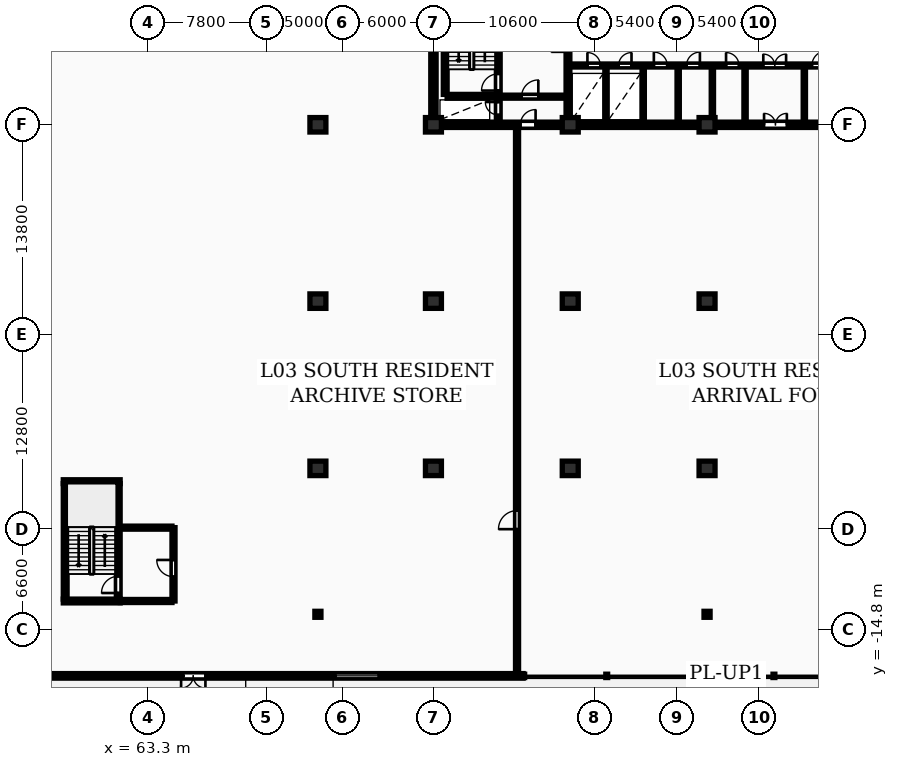
"""IFC4 building model, lengths in metres.
Left out: names, types, materials, properties, quantities, classifications, styles, units other than length and angle.
Written with IfcOpenShell. Run it as: python <this file> out.ifc"""

import sys

from ifc_helpers import new_model, si_unit, direction, frame, frame_2d, origin, origin_2d, place, context, subcontext, project, spatial, rectangle, i_section, extrude, element, fill, save


model = new_model("IFC4")
c1 = context("Model", 3, precision=1e-05, world=origin(), true_north=direction((0.0, 1.0)))
c2 = subcontext(c1, "Body", "Model", "MODEL_VIEW")
j1 = project(units=[si_unit("LENGTHUNIT", "METRE"), si_unit("PLANEANGLEUNIT", "RADIAN")], contexts=[c1])
p1 = place(None, origin())
s1 = spatial("IfcSite", under=j1, at=p1, CompositionType="ELEMENT")
p2 = place(p1, origin())
s2 = spatial("IfcBuilding", under=s1, at=p2, CompositionType="ELEMENT")
p3 = place(p2, frame((0.0, 0.0, 14.5)))
s3 = spatial("IfcBuildingStorey", under=s2, at=p3, CompositionType="ELEMENT", Elevation=14.5)
for number, where, z_axis, x_axis in (
    (1, (74.5, -4.2, 0.0), (0.0, 0.0, 1.0), (1.0, 0.0, 0.0)),
    (2, (74.5, 6.8, 0.0), (0.0, 0.0, 1.0), (1.0, 0.0, 0.0)),
    (3, (74.5, 18.4, 0.0), (0.0, 0.0, 1.0), (1.0, 0.0, 0.0)),
    (4, (82.1, -4.2, 0.0), (0.0, 0.0, 1.0), (1.0, 0.0, 0.0)),
    (5, (82.1, 6.8, 0.0), (0.0, 0.0, 1.0), (1.0, 0.0, 0.0)),
    (6, (82.1, 18.4, 0.0), (0.0, 0.0, 1.0), (1.0, 0.0, 0.0)),
    (7, (91.1, -4.2, 0.0), (0.0, 0.0, 1.0), (1.0, 0.0, 0.0)),
    (8, (91.1, 6.8, 0.0), (0.0, 0.0, 1.0), (1.0, 0.0, 0.0)),
    (9, (91.1, 18.4, 0.0), (0.0, 0.0, 1.0), (1.0, 0.0, 0.0)),
    (10, (100.1, -4.2, 0.0), (0.0, 0.0, 1.0), (1.0, 0.0, 0.0)),
    (11, (100.1, 6.8, 0.0), (0.0, 0.0, 1.0), (1.0, 0.0, 0.0)),
    (12, (100.1, 18.4, 0.0), (0.0, 0.0, 1.0), (1.0, 0.0, 0.0)),
):
    element("IfcColumn", number, at=place(p3, frame(where, z_axis=z_axis, x_axis=x_axis)), inside=s3, PredefinedType="COLUMN", context=c2, shape_type="SweptSolid", body=[
        extrude(rectangle(XDim=1.05, YDim=0.95, at=origin_2d()), origin(), (0.0, 0.0, 1.0), 4.5),
    ])
for number, where, z_axis, x_axis in (
    (13, (74.5, -13.8, 0.0), (0.0, 0.0, 1.0), (1.0, 0.0, 0.0)),
    (14, (100.1, -13.8, 0.0), (0.0, 0.0, 1.0), (1.0, 0.0, 0.0)),
):
    element("IfcColumn", number, at=place(p3, frame(where, z_axis=z_axis, x_axis=x_axis)), inside=s3, PredefinedType="COLUMN", context=c2, shape_type="SweptSolid", body=[
        extrude(i_section(OverallWidth=0.399, OverallDepth=0.394, WebThickness=0.023, FlangeThickness=0.037, FilletRadius=0.015, at=origin_2d()), origin(), (0.0, 0.0, 1.0), 4.5),
    ])
p4 = place(p3, frame((51.5, -17.85, 0.0), z_axis=(0.0, 0.0, 1.0), x_axis=(1.0, 0.0, 0.0)))
e15 = element("IfcWall", 15, at=p4, inside=s3, PredefinedType="STANDARD", context=c2, shape_type="SweptSolid", body=[
    extrude(rectangle(XDim=36.5, YDim=0.3, at=frame_2d((18.25, 0.0))), origin(), (0.0, 0.0, 1.0), 4.18),
])
p5 = place(p4, frame((14.0, 0.0, 0.0)))
e16 = element("IfcOpeningElement", 16, at=p5, cuts=e15, PredefinedType="OPENING", context=c2, shape_type="SweptSolid", body=[
    extrude(rectangle(XDim=1.6, YDim=2.2, at=frame_2d((0.8, 1.1))), frame((0.0, 0.16, 0.0), z_axis=(0.0, -1.0, 0.0), x_axis=(1.0, 0.0, 0.0)), (0.0, 0.0, 1.0), 0.32),
])
p6 = place(p4, frame((24.0, 0.0, 0.9)))
e17 = element("IfcOpeningElement", 17, at=p6, cuts=e15, PredefinedType="OPENING", context=c2, shape_type="SweptSolid", body=[
    extrude(rectangle(XDim=3.0, YDim=2.6, at=frame_2d((1.5, 1.3))), frame((0.0, 0.16, 0.0), z_axis=(0.0, -1.0, 0.0), x_axis=(1.0, 0.0, 0.0)), (0.0, 0.0, 1.0), 0.32),
])
p7 = place(p3, frame((82.1, 18.575, 0.0), z_axis=(0.0, 0.0, 1.0), x_axis=(0.0, 1.0, 0.0)))
e18 = element("IfcWall", 18, at=p7, inside=s3, PredefinedType="SHEAR", context=c2, shape_type="SweptSolid", body=[
    extrude(rectangle(XDim=11.65, YDim=0.35, at=frame_2d((5.825, 0.0))), origin(), (0.0, 0.0, 1.0), 4.5),
])
p8 = place(p3, frame((81.925, 18.4, 0.0), z_axis=(0.0, 0.0, 1.0), x_axis=(1.0, 0.0, 0.0)))
e19 = element("IfcWall", 19, at=p8, inside=s3, PredefinedType="SHEAR", context=c2, shape_type="SweptSolid", body=[
    extrude(rectangle(XDim=36.265, YDim=0.35, at=frame_2d((18.132, 0.0))), origin(), (0.0, 0.0, 1.0), 4.5),
])
p9 = place(p8, frame((5.895, 0.0, 0.0)))
e20 = element("IfcOpeningElement", 20, at=p9, cuts=e19, PredefinedType="OPENING", context=c2, shape_type="SweptSolid", body=[
    extrude(rectangle(XDim=1.0, YDim=2.15, at=frame_2d((0.5, 1.075))), frame((0.0, 0.185, 0.0), z_axis=(0.0, -1.0, 0.0), x_axis=(1.0, 0.0, 0.0)), (0.0, 0.0, 1.0), 0.37),
])
p10 = place(p8, frame((21.925, 0.0, 0.0)))
e21 = element("IfcOpeningElement", 21, at=p10, cuts=e19, PredefinedType="OPENING", context=c2, shape_type="SweptSolid", body=[
    extrude(rectangle(XDim=1.5, YDim=2.2, at=frame_2d((0.75, 1.1))), frame((0.0, 0.185, 0.0), z_axis=(0.0, -1.0, 0.0), x_axis=(1.0, 0.0, 0.0)), (0.0, 0.0, 1.0), 0.37),
])
p11 = place(p8, frame((29.875, 0.0, 0.0)))
e22 = element("IfcOpeningElement", 22, at=p11, cuts=e19, PredefinedType="OPENING", context=c2, shape_type="SweptSolid", body=[
    extrude(rectangle(XDim=1.0, YDim=2.15, at=frame_2d((0.5, 1.075))), frame((0.0, 0.185, 0.0), z_axis=(0.0, -1.0, 0.0), x_axis=(1.0, 0.0, 0.0)), (0.0, 0.0, 1.0), 0.37),
])
p12 = place(p3, frame((82.875, 20.4, 0.0), z_axis=(0.0, 0.0, 1.0), x_axis=(0.0, 1.0, 0.0)))
e23 = element("IfcWall", 23, at=p12, inside=s3, PredefinedType="SHEAR", context=c2, shape_type="SweptSolid", body=[
    extrude(rectangle(XDim=7.6, YDim=0.25, at=frame_2d((3.8, 0.0))), origin(), (0.0, 0.0, 1.0), 4.5),
])
p13 = place(p3, frame((86.365, 18.6, 0.0), z_axis=(0.0, 0.0, 1.0), x_axis=(0.0, 1.0, 0.0)))
e24 = element("IfcWall", 24, at=p13, inside=s3, PredefinedType="SHEAR", context=c2, shape_type="SweptSolid", body=[
    extrude(rectangle(XDim=11.6, YDim=0.25, at=frame_2d((5.8, 0.0))), origin(), (0.0, 0.0, 1.0), 4.5),
])
p14 = place(p13, frame((0.45, 0.0, 0.0)))
e25 = element("IfcOpeningElement", 25, at=p14, cuts=e24, PredefinedType="OPENING", context=c2, shape_type="SweptSolid", body=[
    extrude(rectangle(XDim=0.85, YDim=2.05, at=frame_2d((0.425, 1.025))), frame((0.0, 0.135, 0.0), z_axis=(0.0, -1.0, 0.0), x_axis=(1.0, 0.0, 0.0)), (0.0, 0.0, 1.0), 0.27),
])
p15 = place(p13, frame((2.05, 0.0, 0.0)))
e26 = element("IfcOpeningElement", 26, at=p15, cuts=e24, PredefinedType="OPENING", context=c2, shape_type="SweptSolid", body=[
    extrude(rectangle(XDim=1.1, YDim=2.1, at=frame_2d((0.55, 1.05))), frame((0.0, 0.135, 0.0), z_axis=(0.0, -1.0, 0.0), x_axis=(1.0, 0.0, 0.0)), (0.0, 0.0, 1.0), 0.27),
])
p16 = place(p13, frame((9.95, 0.0, 0.0)))
e27 = element("IfcOpeningElement", 27, at=p16, cuts=e24, PredefinedType="OPENING", context=c2, shape_type="SweptSolid", body=[
    extrude(rectangle(XDim=0.85, YDim=2.05, at=frame_2d((0.425, 1.025))), frame((0.0, 0.135, 0.0), z_axis=(0.0, -1.0, 0.0), x_axis=(1.0, 0.0, 0.0)), (0.0, 0.0, 1.0), 0.27),
])
p17 = place(p3, frame((83.0, 20.275, 0.0), z_axis=(0.0, 0.0, 1.0), x_axis=(1.0, 0.0, 0.0)))
e28 = element("IfcWall", 28, at=p17, inside=s3, PredefinedType="SHEAR", context=c2, shape_type="SweptSolid", body=[
    extrude(rectangle(XDim=3.24, YDim=0.25, at=frame_2d((1.62, 0.0))), origin(), (0.0, 0.0, 1.0), 4.5),
])
p18 = place(p3, frame((86.5, 20.25, 0.0), z_axis=(0.0, 0.0, 1.0), x_axis=(1.0, 0.0, 0.0)))
e29 = element("IfcWall", 29, at=p18, inside=s3, PredefinedType="PARTITIONING", context=c2, shape_type="SweptSolid", body=[
    extrude(rectangle(XDim=4.32, YDim=0.2, at=frame_2d((2.16, 0.0))), origin(), (0.0, 0.0, 1.0), 4.18),
])
p19 = place(p18, frame((1.4, 0.0, 0.0)))
e30 = element("IfcOpeningElement", 30, at=p19, cuts=e29, PredefinedType="OPENING", context=c2, shape_type="SweptSolid", body=[
    extrude(rectangle(XDim=1.1, YDim=2.1, at=frame_2d((0.55, 1.05))), frame((0.0, 0.11, 0.0), z_axis=(0.0, -1.0, 0.0), x_axis=(1.0, 0.0, 0.0)), (0.0, 0.0, 1.0), 0.22),
])
p20 = place(p3, frame((90.95, 18.6, 0.0), z_axis=(0.0, 0.0, 1.0), x_axis=(0.0, 1.0, 0.0)))
e31 = element("IfcWall", 31, at=p20, inside=s3, PredefinedType="SHEAR", context=c2, shape_type="SweptSolid", body=[
    extrude(rectangle(XDim=11.6, YDim=0.25, at=frame_2d((5.8, 0.0))), origin(), (0.0, 0.0, 1.0), 4.5),
])
p21 = place(p20, frame((4.6, 0.0, 0.0)))
e32 = element("IfcOpeningElement", 32, at=p21, cuts=e31, PredefinedType="OPENING", context=c2, shape_type="SweptSolid", body=[
    extrude(rectangle(XDim=1.1, YDim=2.1, at=frame_2d((0.55, 1.05))), frame((0.0, 0.135, 0.0), z_axis=(0.0, -1.0, 0.0), x_axis=(1.0, 0.0, 0.0)), (0.0, 0.0, 1.0), 0.27),
])
for number, where, z_axis, x_axis in (
    (33, (93.45, 18.6, 0.0), (0.0, 0.0, 1.0), (0.0, 1.0, 0.0)),
    (34, (95.9, 18.6, 0.0), (0.0, 0.0, 1.0), (0.0, 1.0, 0.0)),
    (35, (98.2, 18.6, 0.0), (0.0, 0.0, 1.0), (0.0, 1.0, 0.0)),
):
    element("IfcWall", number, at=place(p3, frame(where, z_axis=z_axis, x_axis=x_axis)), inside=s3, PredefinedType="PARTITIONING", context=c2, shape_type="SweptSolid", body=[
        extrude(rectangle(XDim=3.6, YDim=0.15, at=frame_2d((1.8, 0.0))), origin(), (0.0, 0.0, 1.0), 4.18),
    ])
p22 = place(p3, frame((100.45, 18.6, 0.0), z_axis=(0.0, 0.0, 1.0), x_axis=(0.0, 1.0, 0.0)))
e36 = element("IfcWall", 36, at=p22, inside=s3, PredefinedType="PARTITIONING", context=c2, shape_type="SweptSolid", body=[
    extrude(rectangle(XDim=3.6, YDim=0.15, at=frame_2d((1.8, 0.0))), origin(), (0.0, 0.0, 1.0), 3.43),
])
for number, where, z_axis, x_axis in (
    (37, (102.6, 18.6, 0.0), (0.0, 0.0, 1.0), (0.0, 1.0, 0.0)),
    (38, (106.5, 18.6, 0.0), (0.0, 0.0, 1.0), (0.0, 1.0, 0.0)),
):
    element("IfcWall", number, at=place(p3, frame(where, z_axis=z_axis, x_axis=x_axis)), inside=s3, PredefinedType="PARTITIONING", context=c2, shape_type="SweptSolid", body=[
        extrude(rectangle(XDim=3.6, YDim=0.15, at=frame_2d((1.8, 0.0))), origin(), (0.0, 0.0, 1.0), 4.18),
    ])
p23 = place(p3, frame((91.08, 22.3, 0.0), z_axis=(0.0, 0.0, 1.0), x_axis=(1.0, 0.0, 0.0)))
e39 = element("IfcWall", 39, at=p23, inside=s3, PredefinedType="PARTITIONING", context=c2, shape_type="SweptSolid", body=[
    extrude(rectangle(XDim=19.14, YDim=0.2, at=frame_2d((9.57, 0.0))), origin(), (0.0, 0.0, 1.0), 4.18),
])
p24 = place(p23, frame((1.15, 0.0, 0.0)))
e40 = element("IfcOpeningElement", 40, at=p24, cuts=e39, PredefinedType="OPENING", context=c2, shape_type="SweptSolid", body=[
    extrude(rectangle(XDim=0.85, YDim=2.05, at=frame_2d((0.425, 1.025))), frame((0.0, 0.11, 0.0), z_axis=(0.0, -1.0, 0.0), x_axis=(1.0, 0.0, 0.0)), (0.0, 0.0, 1.0), 0.22),
])
p25 = place(p23, frame((3.2, 0.0, 0.0)))
e41 = element("IfcOpeningElement", 41, at=p25, cuts=e39, PredefinedType="OPENING", context=c2, shape_type="SweptSolid", body=[
    extrude(rectangle(XDim=0.85, YDim=2.05, at=frame_2d((0.425, 1.025))), frame((0.0, 0.11, 0.0), z_axis=(0.0, -1.0, 0.0), x_axis=(1.0, 0.0, 0.0)), (0.0, 0.0, 1.0), 0.22),
])
p26 = place(p23, frame((12.72, 0.0, 0.0)))
e42 = element("IfcOpeningElement", 42, at=p26, cuts=e39, PredefinedType="OPENING", context=c2, shape_type="SweptSolid", body=[
    extrude(rectangle(XDim=1.5, YDim=2.2, at=frame_2d((0.75, 1.1))), frame((0.0, 0.11, 0.0), z_axis=(0.0, -1.0, 0.0), x_axis=(1.0, 0.0, 0.0)), (0.0, 0.0, 1.0), 0.22),
])
p27 = place(p23, frame((5.52, 0.0, 0.0)))
e43 = element("IfcOpeningElement", 43, at=p27, cuts=e39, PredefinedType="OPENING", context=c2, shape_type="SweptSolid", body=[
    extrude(rectangle(XDim=0.88, YDim=2.06, at=frame_2d((0.44, 1.03))), frame((0.0, 0.11, 0.0), z_axis=(0.0, -1.0, 0.0), x_axis=(1.0, 0.0, 0.0)), (0.0, 0.0, 1.0), 0.22),
])
p28 = place(p23, frame((7.67, 0.0, 0.0)))
e44 = element("IfcOpeningElement", 44, at=p28, cuts=e39, PredefinedType="OPENING", context=c2, shape_type="SweptSolid", body=[
    extrude(rectangle(XDim=0.88, YDim=2.06, at=frame_2d((0.44, 1.03))), frame((0.0, 0.11, 0.0), z_axis=(0.0, -1.0, 0.0), x_axis=(1.0, 0.0, 0.0)), (0.0, 0.0, 1.0), 0.22),
])
p29 = place(p23, frame((10.27, 0.0, 0.0)))
e45 = element("IfcOpeningElement", 45, at=p29, cuts=e39, PredefinedType="OPENING", context=c2, shape_type="SweptSolid", body=[
    extrude(rectangle(XDim=0.85, YDim=2.05, at=frame_2d((0.425, 1.025))), frame((0.0, 0.11, 0.0), z_axis=(0.0, -1.0, 0.0), x_axis=(1.0, 0.0, 0.0)), (0.0, 0.0, 1.0), 0.22),
])
p30 = place(p23, frame((15.92, 0.0, 0.0)))
e46 = element("IfcOpeningElement", 46, at=p30, cuts=e39, PredefinedType="OPENING", context=c2, shape_type="SweptSolid", body=[
    extrude(rectangle(XDim=0.96, YDim=2.1, at=frame_2d((0.48, 1.05))), frame((0.0, 0.11, 0.0), z_axis=(0.0, -1.0, 0.0), x_axis=(1.0, 0.0, 0.0)), (0.0, 0.0, 1.0), 0.22),
])
p31 = place(p3, frame((57.875, -12.8, 0.0), z_axis=(0.0, 0.0, 1.0), x_axis=(0.0, 1.0, 0.0)))
e47 = element("IfcWall", 47, at=p31, inside=s3, PredefinedType="SHEAR", context=c2, shape_type="SweptSolid", body=[
    extrude(rectangle(XDim=7.6, YDim=0.25, at=frame_2d((3.8, 0.0))), origin(), (0.0, 0.0, 1.0), 4.5),
])
for number, where, z_axis, x_axis in (
    (48, (57.75, -12.925, 0.0), (0.0, 0.0, 1.0), (1.0, 0.0, 0.0)),
    (49, (57.75, -5.075, 0.0), (0.0, 0.0, 1.0), (1.0, 0.0, 0.0)),
):
    element("IfcWall", number, at=place(p3, frame(where, z_axis=z_axis, x_axis=x_axis)), inside=s3, PredefinedType="SHEAR", context=c2, shape_type="SweptSolid", body=[
        extrude(rectangle(XDim=3.74, YDim=0.25, at=frame_2d((1.87, 0.0))), origin(), (0.0, 0.0, 1.0), 4.5),
    ])
p32 = place(p3, frame((61.365, -12.8, 0.0), z_axis=(0.0, 0.0, 1.0), x_axis=(0.0, 1.0, 0.0)))
e50 = element("IfcWall", 50, at=p32, inside=s3, PredefinedType="SHEAR", context=c2, shape_type="SweptSolid", body=[
    extrude(rectangle(XDim=7.6, YDim=0.25, at=frame_2d((3.8, 0.0))), origin(), (0.0, 0.0, 1.0), 4.5),
])
p33 = place(p32, frame((0.4, 0.0, 0.0)))
e51 = element("IfcOpeningElement", 51, at=p33, cuts=e50, PredefinedType="OPENING", context=c2, shape_type="SweptSolid", body=[
    extrude(rectangle(XDim=1.1, YDim=2.1, at=frame_2d((0.55, 1.05))), frame((0.0, 0.135, 0.0), z_axis=(0.0, -1.0, 0.0), x_axis=(1.0, 0.0, 0.0)), (0.0, 0.0, 1.0), 0.27),
])
p34 = place(p3, frame((65.0, -12.925, 0.0), z_axis=(0.0, 0.0, 1.0), x_axis=(0.0, 1.0, 0.0)))
e52 = element("IfcWall", 52, at=p34, inside=s3, PredefinedType="PARTITIONING", context=c2, shape_type="SweptSolid", body=[
    extrude(rectangle(XDim=4.825, YDim=0.2, at=frame_2d((2.413, 0.0))), origin(), (0.0, 0.0, 1.0), 4.18),
])
p35 = place(p34, frame((1.6, 0.0, 0.0)))
e53 = element("IfcOpeningElement", 53, at=p35, cuts=e52, PredefinedType="OPENING", context=c2, shape_type="SweptSolid", body=[
    extrude(rectangle(XDim=1.1, YDim=2.15, at=frame_2d((0.55, 1.075))), frame((0.0, 0.11, 0.0), z_axis=(0.0, -1.0, 0.0), x_axis=(1.0, 0.0, 0.0)), (0.0, 0.0, 1.0), 0.22),
])
for number, where, z_axis, x_axis in (
    (54, (61.5, -12.925, 0.0), (0.0, 0.0, 1.0), (1.0, 0.0, 0.0)),
    (55, (61.5, -8.1, 0.0), (0.0, 0.0, 1.0), (1.0, 0.0, 0.0)),
):
    element("IfcWall", number, at=place(p3, frame(where, z_axis=z_axis, x_axis=x_axis)), inside=s3, PredefinedType="PARTITIONING", context=c2, shape_type="SweptSolid", body=[
        extrude(rectangle(XDim=3.4, YDim=0.2, at=frame_2d((1.7, 0.0))), origin(), (0.0, 0.0, 1.0), 4.18),
    ])
p36 = place(p3, frame((87.6, -17.7, 0.0), z_axis=(0.0, 0.0, 1.0), x_axis=(0.0, 1.0, 0.0)))
e56 = element("IfcWall", 56, at=p36, inside=s3, PredefinedType="PARTITIONING", context=c2, shape_type="SweptSolid", body=[
    extrude(rectangle(XDim=35.95, YDim=0.2, at=frame_2d((17.975, 0.0))), origin(), (0.0, 0.0, 1.0), 4.18),
])
p37 = place(p36, frame((9.5, 0.0, 0.0)))
e57 = element("IfcOpeningElement", 57, at=p37, cuts=e56, PredefinedType="OPENING", context=c2, shape_type="SweptSolid", body=[
    extrude(rectangle(XDim=1.22, YDim=2.18, at=frame_2d((0.61, 1.09))), frame((0.0, 0.11, 0.0), z_axis=(0.0, -1.0, 0.0), x_axis=(1.0, 0.0, 0.0)), (0.0, 0.0, 1.0), 0.22),
])
p38 = place(p5, frame((1.6, 0.0, 0.0), z_axis=(0.0, 0.0, 1.0), x_axis=(-1.0, 0.0, 0.0)))
e58 = element("IfcDoor", 58, at=p38, inside=s3, OperationType="DOUBLE_DOOR_SINGLE_SWING", PredefinedType="DOOR", context=c2, shape_type="SweptSolid", body=[
    extrude(rectangle(XDim=1.6, YDim=2.2, at=frame_2d((0.8, 1.1))), frame((0.0, 0.025, 0.0), z_axis=(0.0, -1.0, 0.0), x_axis=(1.0, 0.0, 0.0)), (0.0, 0.0, 1.0), 0.05),
])
fill(e16, e58)
p39 = place(p6, origin())
e59 = element("IfcWindow", 59, at=p39, inside=s3, PartitioningType="TRIPLE_PANEL_VERTICAL", PredefinedType="WINDOW", context=c2, shape_type="SweptSolid", body=[
    extrude(rectangle(XDim=3.0, YDim=2.6, at=frame_2d((1.5, 1.3))), frame((0.0, 0.03, 0.0), z_axis=(0.0, -1.0, 0.0), x_axis=(1.0, 0.0, 0.0)), (0.0, 0.0, 1.0), 0.06),
])
fill(e17, e59)
p40 = place(p9, origin())
e60 = element("IfcDoor", 60, at=p40, inside=s3, OperationType="SINGLE_SWING_RIGHT", PredefinedType="DOOR", context=c2, shape_type="SweptSolid", body=[
    extrude(rectangle(XDim=1.0, YDim=2.15, at=frame_2d((0.5, 1.075))), frame((0.0, 0.025, 0.0), z_axis=(0.0, -1.0, 0.0), x_axis=(1.0, 0.0, 0.0)), (0.0, 0.0, 1.0), 0.05),
])
fill(e20, e60)
p41 = place(p10, origin())
e61 = element("IfcDoor", 61, at=p41, inside=s3, OperationType="DOUBLE_DOOR_SINGLE_SWING", PredefinedType="DOOR", context=c2, shape_type="SweptSolid", body=[
    extrude(rectangle(XDim=1.5, YDim=2.2, at=frame_2d((0.75, 1.1))), frame((0.0, 0.025, 0.0), z_axis=(0.0, -1.0, 0.0), x_axis=(1.0, 0.0, 0.0)), (0.0, 0.0, 1.0), 0.05),
])
fill(e21, e61)
p42 = place(p14, origin())
e62 = element("IfcDoor", 62, at=p42, inside=s3, OperationType="SINGLE_SWING_RIGHT", PredefinedType="DOOR", context=c2, shape_type="SweptSolid", body=[
    extrude(rectangle(XDim=0.85, YDim=2.05, at=frame_2d((0.425, 1.025))), frame((0.0, 0.025, 0.0), z_axis=(0.0, -1.0, 0.0), x_axis=(1.0, 0.0, 0.0)), (0.0, 0.0, 1.0), 0.05),
])
fill(e25, e62)
p43 = place(p15, origin())
e63 = element("IfcDoor", 63, at=p43, inside=s3, OperationType="SINGLE_SWING_LEFT", PredefinedType="DOOR", context=c2, shape_type="SweptSolid", body=[
    extrude(rectangle(XDim=1.1, YDim=2.1, at=frame_2d((0.55, 1.05))), frame((0.0, 0.025, 0.0), z_axis=(0.0, -1.0, 0.0), x_axis=(1.0, 0.0, 0.0)), (0.0, 0.0, 1.0), 0.05),
])
fill(e26, e63)
p44 = place(p19, origin())
e64 = element("IfcDoor", 64, at=p44, inside=s3, OperationType="SINGLE_SWING_RIGHT", PredefinedType="DOOR", context=c2, shape_type="SweptSolid", body=[
    extrude(rectangle(XDim=1.1, YDim=2.1, at=frame_2d((0.55, 1.05))), frame((0.0, 0.025, 0.0), z_axis=(0.0, -1.0, 0.0), x_axis=(1.0, 0.0, 0.0)), (0.0, 0.0, 1.0), 0.05),
])
fill(e30, e64)
p45 = place(p24, origin())
e65 = element("IfcDoor", 65, at=p45, inside=s3, OperationType="SINGLE_SWING_LEFT", PredefinedType="DOOR", context=c2, shape_type="SweptSolid", body=[
    extrude(rectangle(XDim=0.85, YDim=2.05, at=frame_2d((0.425, 1.025))), frame((0.0, 0.025, 0.0), z_axis=(0.0, -1.0, 0.0), x_axis=(1.0, 0.0, 0.0)), (0.0, 0.0, 1.0), 0.05),
])
fill(e40, e65)
p46 = place(p25, origin())
e66 = element("IfcDoor", 66, at=p46, inside=s3, OperationType="SINGLE_SWING_RIGHT", PredefinedType="DOOR", context=c2, shape_type="SweptSolid", body=[
    extrude(rectangle(XDim=0.85, YDim=2.05, at=frame_2d((0.425, 1.025))), frame((0.0, 0.025, 0.0), z_axis=(0.0, -1.0, 0.0), x_axis=(1.0, 0.0, 0.0)), (0.0, 0.0, 1.0), 0.05),
])
fill(e41, e66)
p47 = place(p26, origin())
e67 = element("IfcDoor", 67, at=p47, inside=s3, OperationType="DOUBLE_DOOR_SINGLE_SWING", PredefinedType="DOOR", context=c2, shape_type="SweptSolid", body=[
    extrude(rectangle(XDim=1.5, YDim=2.2, at=frame_2d((0.75, 1.1))), frame((0.0, 0.025, 0.0), z_axis=(0.0, -1.0, 0.0), x_axis=(1.0, 0.0, 0.0)), (0.0, 0.0, 1.0), 0.05),
])
fill(e42, e67)
p48 = place(p27, origin())
e68 = element("IfcDoor", 68, at=p48, inside=s3, OperationType="SINGLE_SWING_LEFT", PredefinedType="DOOR", context=c2, shape_type="SweptSolid", body=[
    extrude(rectangle(XDim=0.88, YDim=2.06, at=frame_2d((0.44, 1.03))), frame((0.0, 0.025, 0.0), z_axis=(0.0, -1.0, 0.0), x_axis=(1.0, 0.0, 0.0)), (0.0, 0.0, 1.0), 0.05),
])
fill(e43, e68)
p49 = place(p28, origin())
e69 = element("IfcDoor", 69, at=p49, inside=s3, OperationType="SINGLE_SWING_RIGHT", PredefinedType="DOOR", context=c2, shape_type="SweptSolid", body=[
    extrude(rectangle(XDim=0.88, YDim=2.06, at=frame_2d((0.44, 1.03))), frame((0.0, 0.025, 0.0), z_axis=(0.0, -1.0, 0.0), x_axis=(1.0, 0.0, 0.0)), (0.0, 0.0, 1.0), 0.05),
])
fill(e44, e69)
p50 = place(p29, origin())
e70 = element("IfcDoor", 70, at=p50, inside=s3, OperationType="SINGLE_SWING_LEFT", PredefinedType="DOOR", context=c2, shape_type="SweptSolid", body=[
    extrude(rectangle(XDim=0.85, YDim=2.05, at=frame_2d((0.425, 1.025))), frame((0.0, 0.025, 0.0), z_axis=(0.0, -1.0, 0.0), x_axis=(1.0, 0.0, 0.0)), (0.0, 0.0, 1.0), 0.05),
])
fill(e45, e70)
p51 = place(p30, origin())
e71 = element("IfcDoor", 71, at=p51, inside=s3, OperationType="SINGLE_SWING_RIGHT", PredefinedType="DOOR", context=c2, shape_type="SweptSolid", body=[
    extrude(rectangle(XDim=0.96, YDim=2.1, at=frame_2d((0.48, 1.05))), frame((0.0, 0.025, 0.0), z_axis=(0.0, -1.0, 0.0), x_axis=(1.0, 0.0, 0.0)), (0.0, 0.0, 1.0), 0.05),
])
fill(e46, e71)
p52 = place(p33, origin())
e72 = element("IfcDoor", 72, at=p52, inside=s3, OperationType="SINGLE_SWING_LEFT", PredefinedType="DOOR", context=c2, shape_type="SweptSolid", body=[
    extrude(rectangle(XDim=1.1, YDim=2.1, at=frame_2d((0.55, 1.05))), frame((0.0, 0.025, 0.0), z_axis=(0.0, -1.0, 0.0), x_axis=(1.0, 0.0, 0.0)), (0.0, 0.0, 1.0), 0.05),
])
fill(e51, e72)
p53 = place(p35, origin())
e73 = element("IfcDoor", 73, at=p53, inside=s3, OperationType="SINGLE_SWING_RIGHT", PredefinedType="DOOR", context=c2, shape_type="SweptSolid", body=[
    extrude(rectangle(XDim=1.1, YDim=2.15, at=frame_2d((0.55, 1.075))), frame((0.0, 0.025, 0.0), z_axis=(0.0, -1.0, 0.0), x_axis=(1.0, 0.0, 0.0)), (0.0, 0.0, 1.0), 0.05),
])
fill(e53, e73)
p54 = place(p37, origin())
e74 = element("IfcDoor", 74, at=p54, inside=s3, OperationType="SINGLE_SWING_LEFT", PredefinedType="DOOR", context=c2, shape_type="SweptSolid", body=[
    extrude(rectangle(XDim=1.22, YDim=2.18, at=frame_2d((0.61, 1.09))), frame((0.0, 0.025, 0.0), z_axis=(0.0, -1.0, 0.0), x_axis=(1.0, 0.0, 0.0)), (0.0, 0.0, 1.0), 0.05),
])
fill(e57, e74)
save(model, sys.argv[1])
